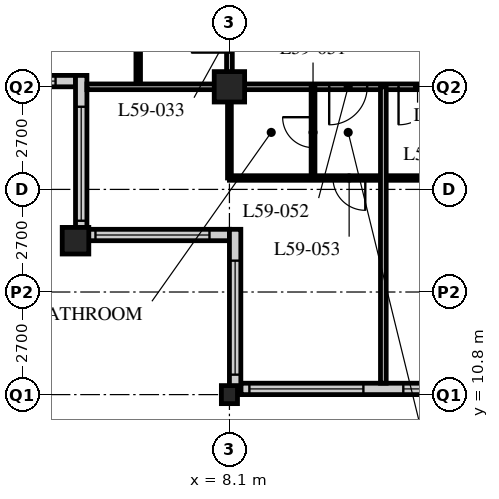
"""IFC4 building model, lengths in metres.
Left out: names, types, materials, properties, quantities, classifications, styles, units other than length and angle.
Written with IfcOpenShell. Run it as: python <this file> out.ifc"""

import sys

from ifc_helpers import new_model, si_unit, direction, frame, frame_2d, origin, origin_2d, place, context, subcontext, project, spatial, rectangle, hollow_rectangle, i_section, extrude, element, fill, save


model = new_model("IFC4")
c1 = context("Model", 3, precision=1e-05, world=origin(), true_north=direction((0.0, 1.0)))
c2 = subcontext(c1, "Body", "Model", "MODEL_VIEW")
j1 = project(units=[si_unit("LENGTHUNIT", "METRE"), si_unit("PLANEANGLEUNIT", "RADIAN")], contexts=[c1])
p1 = place(None, origin())
s1 = spatial("IfcSite", under=j1, at=p1, CompositionType="ELEMENT")
p2 = place(p1, origin())
s2 = spatial("IfcBuilding", under=s1, at=p2, CompositionType="ELEMENT")
p3 = place(p2, frame((0.0, 0.0, 228.0)))
s3 = spatial("IfcBuildingStorey", under=s2, at=p3, CompositionType="ELEMENT", Elevation=228.0)
p4 = place(p3, frame((4.05, 14.85, 0.0), z_axis=(0.0, 0.0, 1.0), x_axis=(1.0, 0.0, 0.0)))
e1 = element("IfcColumn", 1, at=p4, inside=s3, PredefinedType="COLUMN", context=c2, shape_type="SweptSolid", body=[
    extrude(hollow_rectangle(XDim=0.7, YDim=0.7, WallThickness=0.07, at=origin_2d()), origin(), (0.0, 0.0, 1.0), 3.6),
])
p5 = place(p3, frame((8.1, 10.8, 0.0), z_axis=(0.0, 0.0, 1.0), x_axis=(1.0, 0.0, 0.0)))
e2 = element("IfcColumn", 2, at=p5, inside=s3, PredefinedType="COLUMN", context=c2, shape_type="SweptSolid", body=[
    extrude(i_section(OverallWidth=0.424, OverallDepth=0.475, WebThickness=0.048, FlangeThickness=0.077, FilletRadius=0.015, at=origin_2d()), origin(), (0.0, 0.0, 1.0), 3.6),
])
p6 = place(p3, frame((8.1, 18.9, 0.0), z_axis=(0.0, 0.0, 1.0), x_axis=(1.0, 0.0, 0.0)))
e3 = element("IfcColumn", 3, at=p6, inside=s3, PredefinedType="COLUMN", context=c2, shape_type="SweptSolid", body=[
    extrude(hollow_rectangle(XDim=0.8, YDim=0.8, WallThickness=0.08, at=origin_2d()), origin(), (0.0, 0.0, 1.0), 3.6),
])
p7 = place(p3, frame((8.4, 10.95, 0.0), z_axis=(0.0, 0.0, 1.0), x_axis=(1.0, 0.0, 0.0)))
e4 = element("IfcWall", 4, at=p7, inside=s3, PredefinedType="SOLIDWALL", context=c2, shape_type="SweptSolid", body=[
    extrude(rectangle(XDim=40.2, YDim=0.3, at=frame_2d((20.1, 0.0))), origin(), (0.0, 0.0, 1.0), 3.39),
])
p8 = place(p7, frame((0.225, 0.0, 0.6)))
e5 = element("IfcOpeningElement", 5, at=p8, cuts=e4, PredefinedType="OPENING", context=c2, shape_type="SweptSolid", body=[
    extrude(rectangle(XDim=3.0, YDim=2.0, at=frame_2d((1.5, 1.0))), frame((0.0, 0.16, 0.0), z_axis=(0.0, -1.0, 0.0), x_axis=(1.0, 0.0, 0.0)), (0.0, 0.0, 1.0), 0.32),
])
p9 = place(p7, frame((4.275, 0.0, 0.6)))
e6 = element("IfcOpeningElement", 6, at=p9, cuts=e4, PredefinedType="OPENING", context=c2, shape_type="SweptSolid", body=[
    extrude(rectangle(XDim=3.0, YDim=2.0, at=frame_2d((1.5, 1.0))), frame((0.0, 0.16, 0.0), z_axis=(0.0, -1.0, 0.0), x_axis=(1.0, 0.0, 0.0)), (0.0, 0.0, 1.0), 0.32),
])
p10 = place(p7, frame((8.325, 0.0, 0.6)))
e7 = element("IfcOpeningElement", 7, at=p10, cuts=e4, PredefinedType="OPENING", context=c2, shape_type="SweptSolid", body=[
    extrude(rectangle(XDim=3.0, YDim=2.0, at=frame_2d((1.5, 1.0))), frame((0.0, 0.16, 0.0), z_axis=(0.0, -1.0, 0.0), x_axis=(1.0, 0.0, 0.0)), (0.0, 0.0, 1.0), 0.32),
])
p11 = place(p7, frame((12.375, 0.0, 0.6)))
e8 = element("IfcOpeningElement", 8, at=p11, cuts=e4, PredefinedType="OPENING", context=c2, shape_type="SweptSolid", body=[
    extrude(rectangle(XDim=3.0, YDim=2.0, at=frame_2d((1.5, 1.0))), frame((0.0, 0.16, 0.0), z_axis=(0.0, -1.0, 0.0), x_axis=(1.0, 0.0, 0.0)), (0.0, 0.0, 1.0), 0.32),
])
p12 = place(p7, frame((16.425, 0.0, 0.6)))
e9 = element("IfcOpeningElement", 9, at=p12, cuts=e4, PredefinedType="OPENING", context=c2, shape_type="SweptSolid", body=[
    extrude(rectangle(XDim=3.0, YDim=2.0, at=frame_2d((1.5, 1.0))), frame((0.0, 0.16, 0.0), z_axis=(0.0, -1.0, 0.0), x_axis=(1.0, 0.0, 0.0)), (0.0, 0.0, 1.0), 0.32),
])
p13 = place(p7, frame((20.475, 0.0, 0.6)))
e10 = element("IfcOpeningElement", 10, at=p13, cuts=e4, PredefinedType="OPENING", context=c2, shape_type="SweptSolid", body=[
    extrude(rectangle(XDim=3.0, YDim=2.0, at=frame_2d((1.5, 1.0))), frame((0.0, 0.16, 0.0), z_axis=(0.0, -1.0, 0.0), x_axis=(1.0, 0.0, 0.0)), (0.0, 0.0, 1.0), 0.32),
])
p14 = place(p7, frame((24.525, 0.0, 0.6)))
e11 = element("IfcOpeningElement", 11, at=p14, cuts=e4, PredefinedType="OPENING", context=c2, shape_type="SweptSolid", body=[
    extrude(rectangle(XDim=3.0, YDim=2.0, at=frame_2d((1.5, 1.0))), frame((0.0, 0.16, 0.0), z_axis=(0.0, -1.0, 0.0), x_axis=(1.0, 0.0, 0.0)), (0.0, 0.0, 1.0), 0.32),
])
p15 = place(p7, frame((28.575, 0.0, 0.6)))
e12 = element("IfcOpeningElement", 12, at=p15, cuts=e4, PredefinedType="OPENING", context=c2, shape_type="SweptSolid", body=[
    extrude(rectangle(XDim=3.0, YDim=2.0, at=frame_2d((1.5, 1.0))), frame((0.0, 0.16, 0.0), z_axis=(0.0, -1.0, 0.0), x_axis=(1.0, 0.0, 0.0)), (0.0, 0.0, 1.0), 0.32),
])
p16 = place(p7, frame((32.625, 0.0, 0.6)))
e13 = element("IfcOpeningElement", 13, at=p16, cuts=e4, PredefinedType="OPENING", context=c2, shape_type="SweptSolid", body=[
    extrude(rectangle(XDim=3.0, YDim=2.0, at=frame_2d((1.5, 1.0))), frame((0.0, 0.16, 0.0), z_axis=(0.0, -1.0, 0.0), x_axis=(1.0, 0.0, 0.0)), (0.0, 0.0, 1.0), 0.32),
])
p17 = place(p7, frame((36.675, 0.0, 0.6)))
e14 = element("IfcOpeningElement", 14, at=p17, cuts=e4, PredefinedType="OPENING", context=c2, shape_type="SweptSolid", body=[
    extrude(rectangle(XDim=3.0, YDim=2.0, at=frame_2d((1.5, 1.0))), frame((0.0, 0.16, 0.0), z_axis=(0.0, -1.0, 0.0), x_axis=(1.0, 0.0, 0.0)), (0.0, 0.0, 1.0), 0.32),
])
p18 = place(p3, frame((0.3, 19.05, 0.0), z_axis=(0.0, 0.0, 1.0), x_axis=(1.0, 0.0, 0.0)))
e15 = element("IfcWall", 15, at=p18, inside=s3, PredefinedType="SOLIDWALL", context=c2, shape_type="SweptSolid", body=[
    extrude(rectangle(XDim=3.75, YDim=0.3, at=frame_2d((1.875, 0.0))), origin(), (0.0, 0.0, 1.0), 3.39),
])
p19 = place(p18, frame((0.225, 0.0, 0.6)))
e16 = element("IfcOpeningElement", 16, at=p19, cuts=e15, PredefinedType="OPENING", context=c2, shape_type="SweptSolid", body=[
    extrude(rectangle(XDim=3.0, YDim=2.0, at=frame_2d((1.5, 1.0))), frame((0.0, 0.16, 0.0), z_axis=(0.0, -1.0, 0.0), x_axis=(1.0, 0.0, 0.0)), (0.0, 0.0, 1.0), 0.32),
])
p20 = place(p3, frame((4.2, 19.2, 0.0), z_axis=(0.0, 0.0, 1.0), x_axis=(0.0, -1.0, 0.0)))
e17 = element("IfcWall", 17, at=p20, inside=s3, PredefinedType="SOLIDWALL", context=c2, shape_type="SweptSolid", body=[
    extrude(rectangle(XDim=4.35, YDim=0.3, at=frame_2d((2.175, 0.0))), origin(), (0.0, 0.0, 1.0), 3.39),
])
p21 = place(p20, frame((0.825, 0.0, 0.6)))
e18 = element("IfcOpeningElement", 18, at=p21, cuts=e17, PredefinedType="OPENING", context=c2, shape_type="SweptSolid", body=[
    extrude(rectangle(XDim=3.0, YDim=2.0, at=frame_2d((1.5, 1.0))), frame((0.0, 0.16, 0.0), z_axis=(0.0, -1.0, 0.0), x_axis=(1.0, 0.0, 0.0)), (0.0, 0.0, 1.0), 0.32),
])
p22 = place(p3, frame((4.35, 15.0, 0.0), z_axis=(0.0, 0.0, 1.0), x_axis=(1.0, 0.0, 0.0)))
e19 = element("IfcWall", 19, at=p22, inside=s3, PredefinedType="SOLIDWALL", context=c2, shape_type="SweptSolid", body=[
    extrude(rectangle(XDim=3.75, YDim=0.3, at=frame_2d((1.875, 0.0))), origin(), (0.0, 0.0, 1.0), 3.39),
])
p23 = place(p22, frame((0.225, 0.0, 0.6)))
e20 = element("IfcOpeningElement", 20, at=p23, cuts=e19, PredefinedType="OPENING", context=c2, shape_type="SweptSolid", body=[
    extrude(rectangle(XDim=3.0, YDim=2.0, at=frame_2d((1.5, 1.0))), frame((0.0, 0.16, 0.0), z_axis=(0.0, -1.0, 0.0), x_axis=(1.0, 0.0, 0.0)), (0.0, 0.0, 1.0), 0.32),
])
p24 = place(p3, frame((8.25, 15.15, 0.0), z_axis=(0.0, 0.0, 1.0), x_axis=(0.0, -1.0, 0.0)))
e21 = element("IfcWall", 21, at=p24, inside=s3, PredefinedType="SOLIDWALL", context=c2, shape_type="SweptSolid", body=[
    extrude(rectangle(XDim=4.35, YDim=0.3, at=frame_2d((2.175, 0.0))), origin(), (0.0, 0.0, 1.0), 3.39),
])
p25 = place(p24, frame((0.825, 0.0, 0.6)))
e22 = element("IfcOpeningElement", 22, at=p25, cuts=e21, PredefinedType="OPENING", context=c2, shape_type="SweptSolid", body=[
    extrude(rectangle(XDim=3.0, YDim=2.0, at=frame_2d((1.5, 1.0))), frame((0.0, 0.16, 0.0), z_axis=(0.0, -1.0, 0.0), x_axis=(1.0, 0.0, 0.0)), (0.0, 0.0, 1.0), 0.32),
])
p26 = place(p3, frame((8.1, 18.9, 0.0), z_axis=(0.0, 0.0, 1.0), x_axis=(1.0, 0.0, 0.0)))
e23 = element("IfcWall", 23, at=p26, inside=s3, PredefinedType="PARTITIONING", context=c2, shape_type="SweptSolid", body=[
    extrude(rectangle(XDim=36.45, YDim=0.15, at=frame_2d((18.225, 0.0))), origin(), (0.0, 0.0, 1.0), 2.628),
])
p27 = place(p26, frame((4.45, 0.0, 0.0)))
e24 = element("IfcOpeningElement", 24, at=p27, cuts=e23, PredefinedType="OPENING", context=c2, shape_type="SweptSolid", body=[
    extrude(rectangle(XDim=1.0, YDim=2.1, at=frame_2d((0.5, 1.05))), frame((0.0, 0.085, 0.0), z_axis=(0.0, -1.0, 0.0), x_axis=(1.0, 0.0, 0.0)), (0.0, 0.0, 1.0), 0.17),
])
p28 = place(p26, frame((17.1, 0.0, 0.0)))
e25 = element("IfcOpeningElement", 25, at=p28, cuts=e23, PredefinedType="OPENING", context=c2, shape_type="SweptSolid", body=[
    extrude(rectangle(XDim=1.0, YDim=2.1, at=frame_2d((0.5, 1.05))), frame((0.0, 0.085, 0.0), z_axis=(0.0, -1.0, 0.0), x_axis=(1.0, 0.0, 0.0)), (0.0, 0.0, 1.0), 0.17),
])
p29 = place(p26, frame((29.05, 0.0, 0.0)))
e26 = element("IfcOpeningElement", 26, at=p29, cuts=e23, PredefinedType="OPENING", context=c2, shape_type="SweptSolid", body=[
    extrude(rectangle(XDim=1.0, YDim=2.1, at=frame_2d((0.5, 1.05))), frame((0.0, 0.085, 0.0), z_axis=(0.0, -1.0, 0.0), x_axis=(1.0, 0.0, 0.0)), (0.0, 0.0, 1.0), 0.17),
])
p30 = place(p26, frame((2.625, 0.0, 0.0)))
e27 = element("IfcOpeningElement", 27, at=p30, cuts=e23, PredefinedType="OPENING", context=c2, shape_type="SweptSolid", body=[
    extrude(rectangle(XDim=1.0, YDim=2.1, at=frame_2d((0.5, 1.05))), frame((0.0, 0.085, 0.0), z_axis=(0.0, -1.0, 0.0), x_axis=(1.0, 0.0, 0.0)), (0.0, 0.0, 1.0), 0.17),
])
p31 = place(p26, frame((33.925, 0.0, 0.0)))
e28 = element("IfcOpeningElement", 28, at=p31, cuts=e23, PredefinedType="OPENING", context=c2, shape_type="SweptSolid", body=[
    extrude(rectangle(XDim=1.0, YDim=2.1, at=frame_2d((0.5, 1.05))), frame((0.0, 0.085, 0.0), z_axis=(0.0, -1.0, 0.0), x_axis=(1.0, 0.0, 0.0)), (0.0, 0.0, 1.0), 0.17),
])
p32 = place(p3, frame((8.1, 18.9, 0.0), z_axis=(0.0, 0.0, 1.0), x_axis=(0.0, 1.0, 0.0)))
e29 = element("IfcWall", 29, at=p32, inside=s3, PredefinedType="PARTITIONING", context=c2, shape_type="SweptSolid", body=[
    extrude(rectangle(XDim=24.3, YDim=0.15, at=frame_2d((12.15, 0.0))), origin(), (0.0, 0.0, 1.0), 2.628),
])
p33 = place(p32, frame((0.9, 0.0, 0.0)))
e30 = element("IfcOpeningElement", 30, at=p33, cuts=e29, PredefinedType="OPENING", context=c2, shape_type="SweptSolid", body=[
    extrude(rectangle(XDim=1.0, YDim=2.1, at=frame_2d((0.5, 1.05))), frame((0.0, 0.085, 0.0), z_axis=(0.0, -1.0, 0.0), x_axis=(1.0, 0.0, 0.0)), (0.0, 0.0, 1.0), 0.17),
])
p34 = place(p32, frame((20.95, 0.0, 0.0)))
e31 = element("IfcOpeningElement", 31, at=p34, cuts=e29, PredefinedType="OPENING", context=c2, shape_type="SweptSolid", body=[
    extrude(rectangle(XDim=1.0, YDim=2.1, at=frame_2d((0.5, 1.05))), frame((0.0, 0.085, 0.0), z_axis=(0.0, -1.0, 0.0), x_axis=(1.0, 0.0, 0.0)), (0.0, 0.0, 1.0), 0.17),
])
p35 = place(p3, frame((5.7, 18.9, 0.0), z_axis=(0.0, 0.0, 1.0), x_axis=(0.0, 1.0, 0.0)))
e32 = element("IfcWall", 32, at=p35, inside=s3, PredefinedType="PARTITIONING", context=c2, shape_type="SweptSolid", body=[
    extrude(rectangle(XDim=20.25, YDim=0.12, at=frame_2d((10.125, 0.0))), origin(), (0.0, 0.0, 1.0), 3.39),
])
p36 = place(p35, frame((0.975, 0.0, 0.0)))
e33 = element("IfcOpeningElement", 33, at=p36, cuts=e32, PredefinedType="OPENING", context=c2, shape_type="SweptSolid", body=[
    extrude(rectangle(XDim=0.85, YDim=2.1, at=frame_2d((0.425, 1.05))), frame((0.0, 0.07, 0.0), z_axis=(0.0, -1.0, 0.0), x_axis=(1.0, 0.0, 0.0)), (0.0, 0.0, 1.0), 0.14),
])
p37 = place(p35, frame((8.425, 0.0, 0.0)))
e34 = element("IfcOpeningElement", 34, at=p37, cuts=e32, PredefinedType="OPENING", context=c2, shape_type="SweptSolid", body=[
    extrude(rectangle(XDim=0.85, YDim=2.1, at=frame_2d((0.425, 1.05))), frame((0.0, 0.07, 0.0), z_axis=(0.0, -1.0, 0.0), x_axis=(1.0, 0.0, 0.0)), (0.0, 0.0, 1.0), 0.14),
])
p38 = place(p35, frame((12.475, 0.0, 0.0)))
e35 = element("IfcOpeningElement", 35, at=p38, cuts=e32, PredefinedType="OPENING", context=c2, shape_type="SweptSolid", body=[
    extrude(rectangle(XDim=0.85, YDim=2.1, at=frame_2d((0.425, 1.05))), frame((0.0, 0.07, 0.0), z_axis=(0.0, -1.0, 0.0), x_axis=(1.0, 0.0, 0.0)), (0.0, 0.0, 1.0), 0.14),
])
p39 = place(p35, frame((16.525, 0.0, 0.0)))
e36 = element("IfcOpeningElement", 36, at=p39, cuts=e32, PredefinedType="OPENING", context=c2, shape_type="SweptSolid", body=[
    extrude(rectangle(XDim=0.85, YDim=2.1, at=frame_2d((0.425, 1.05))), frame((0.0, 0.07, 0.0), z_axis=(0.0, -1.0, 0.0), x_axis=(1.0, 0.0, 0.0)), (0.0, 0.0, 1.0), 0.14),
])
p40 = place(p3, frame((8.1, 16.5, 0.0), z_axis=(0.0, 0.0, 1.0), x_axis=(1.0, 0.0, 0.0)))
e37 = element("IfcWall", 37, at=p40, inside=s3, PredefinedType="PARTITIONING", context=c2, shape_type="SweptSolid", body=[
    extrude(rectangle(XDim=28.35, YDim=0.12, at=frame_2d((14.175, 0.0))), origin(), (0.0, 0.0, 1.0), 3.39),
])
p41 = place(p40, frame((5.025, 0.0, 0.0)))
e38 = element("IfcOpeningElement", 38, at=p41, cuts=e37, PredefinedType="OPENING", context=c2, shape_type="SweptSolid", body=[
    extrude(rectangle(XDim=0.85, YDim=2.1, at=frame_2d((0.425, 1.05))), frame((0.0, 0.07, 0.0), z_axis=(0.0, -1.0, 0.0), x_axis=(1.0, 0.0, 0.0)), (0.0, 0.0, 1.0), 0.14),
])
p42 = place(p40, frame((12.475, 0.0, 0.0)))
e39 = element("IfcOpeningElement", 39, at=p42, cuts=e37, PredefinedType="OPENING", context=c2, shape_type="SweptSolid", body=[
    extrude(rectangle(XDim=0.85, YDim=2.1, at=frame_2d((0.425, 1.05))), frame((0.0, 0.07, 0.0), z_axis=(0.0, -1.0, 0.0), x_axis=(1.0, 0.0, 0.0)), (0.0, 0.0, 1.0), 0.14),
])
p43 = place(p40, frame((17.175, 0.0, 0.0)))
e40 = element("IfcOpeningElement", 40, at=p43, cuts=e37, PredefinedType="OPENING", context=c2, shape_type="SweptSolid", body=[
    extrude(rectangle(XDim=0.85, YDim=2.1, at=frame_2d((0.425, 1.05))), frame((0.0, 0.07, 0.0), z_axis=(0.0, -1.0, 0.0), x_axis=(1.0, 0.0, 0.0)), (0.0, 0.0, 1.0), 0.14),
])
p44 = place(p40, frame((24.625, 0.0, 0.0)))
e41 = element("IfcOpeningElement", 41, at=p44, cuts=e37, PredefinedType="OPENING", context=c2, shape_type="SweptSolid", body=[
    extrude(rectangle(XDim=0.85, YDim=2.1, at=frame_2d((0.425, 1.05))), frame((0.0, 0.07, 0.0), z_axis=(0.0, -1.0, 0.0), x_axis=(1.0, 0.0, 0.0)), (0.0, 0.0, 1.0), 0.14),
])
p45 = place(p40, frame((2.725, 0.0, 0.0)))
e42 = element("IfcOpeningElement", 42, at=p45, cuts=e37, PredefinedType="OPENING", context=c2, shape_type="SweptSolid", body=[
    extrude(rectangle(XDim=0.85, YDim=2.1, at=frame_2d((0.425, 1.05))), frame((0.0, 0.07, 0.0), z_axis=(0.0, -1.0, 0.0), x_axis=(1.0, 0.0, 0.0)), (0.0, 0.0, 1.0), 0.14),
])
p46 = place(p3, frame((10.3, 18.9, 0.0), z_axis=(0.0, 0.0, 1.0), x_axis=(0.0, -1.0, 0.0)))
e43 = element("IfcWall", 43, at=p46, inside=s3, PredefinedType="PARTITIONING", context=c2, shape_type="SweptSolid", body=[
    extrude(rectangle(XDim=2.4, YDim=0.1, at=frame_2d((1.2, 0.0))), origin(), (0.0, 0.0, 1.0), 3.39),
])
p47 = place(p46, frame((0.8, 0.0, 0.0)))
e44 = element("IfcOpeningElement", 44, at=p47, cuts=e43, PredefinedType="OPENING", context=c2, shape_type="SweptSolid", body=[
    extrude(rectangle(XDim=0.8, YDim=2.1, at=frame_2d((0.4, 1.05))), frame((0.0, 0.06, 0.0), z_axis=(0.0, -1.0, 0.0), x_axis=(1.0, 0.0, 0.0)), (0.0, 0.0, 1.0), 0.12),
])
p48 = place(p3, frame((8.1, 18.9, 0.0), z_axis=(0.0, 0.0, 1.0), x_axis=(0.0, -1.0, 0.0)))
e45 = element("IfcWall", 45, at=p48, inside=s3, PredefinedType="PARTITIONING", context=c2, shape_type="SweptSolid", body=[
    extrude(rectangle(XDim=2.4, YDim=0.1, at=frame_2d((1.2, 0.0))), origin(), (0.0, 0.0, 1.0), 2.628),
])
p49 = place(p3, frame((4.35, 18.9, 0.0), z_axis=(0.0, 0.0, 1.0), x_axis=(1.0, 0.0, 0.0)))
e46 = element("IfcWall", 46, at=p49, inside=s3, PredefinedType="PARTITIONING", context=c2, shape_type="SweptSolid", body=[
    extrude(rectangle(XDim=3.75, YDim=0.15, at=frame_2d((1.875, 0.0))), origin(), (0.0, 0.0, 1.0), 2.628),
])
p50 = place(p3, frame((12.15, 18.9, 0.0), z_axis=(0.0, 0.0, 1.0), x_axis=(0.0, -1.0, 0.0)))
e47 = element("IfcWall", 47, at=p50, inside=s3, PredefinedType="PARTITIONING", context=c2, shape_type="SweptSolid", body=[
    extrude(rectangle(XDim=7.8, YDim=0.15, at=frame_2d((3.9, 0.0))), origin(), (0.0, 0.0, 1.0), 3.39),
])
p51 = place(p8, origin())
e48 = element("IfcWindow", 48, at=p51, inside=s3, PartitioningType="SINGLE_PANEL", PredefinedType="WINDOW", context=c2, shape_type="SweptSolid", body=[
    extrude(rectangle(XDim=3.0, YDim=2.0, at=frame_2d((1.5, 1.0))), frame((0.0, 0.03, 0.0), z_axis=(0.0, -1.0, 0.0), x_axis=(1.0, 0.0, 0.0)), (0.0, 0.0, 1.0), 0.06),
])
fill(e5, e48)
p52 = place(p9, origin())
e49 = element("IfcWindow", 49, at=p52, inside=s3, PartitioningType="SINGLE_PANEL", PredefinedType="WINDOW", context=c2, shape_type="SweptSolid", body=[
    extrude(rectangle(XDim=3.0, YDim=2.0, at=frame_2d((1.5, 1.0))), frame((0.0, 0.03, 0.0), z_axis=(0.0, -1.0, 0.0), x_axis=(1.0, 0.0, 0.0)), (0.0, 0.0, 1.0), 0.06),
])
fill(e6, e49)
p53 = place(p19, origin())
e50 = element("IfcWindow", 50, at=p53, inside=s3, PartitioningType="SINGLE_PANEL", PredefinedType="WINDOW", context=c2, shape_type="SweptSolid", body=[
    extrude(rectangle(XDim=3.0, YDim=2.0, at=frame_2d((1.5, 1.0))), frame((0.0, 0.03, 0.0), z_axis=(0.0, -1.0, 0.0), x_axis=(1.0, 0.0, 0.0)), (0.0, 0.0, 1.0), 0.06),
])
fill(e16, e50)
p54 = place(p21, origin())
e51 = element("IfcWindow", 51, at=p54, inside=s3, PartitioningType="SINGLE_PANEL", PredefinedType="WINDOW", context=c2, shape_type="SweptSolid", body=[
    extrude(rectangle(XDim=3.0, YDim=2.0, at=frame_2d((1.5, 1.0))), frame((0.0, 0.03, 0.0), z_axis=(0.0, -1.0, 0.0), x_axis=(1.0, 0.0, 0.0)), (0.0, 0.0, 1.0), 0.06),
])
fill(e18, e51)
p55 = place(p23, origin())
e52 = element("IfcWindow", 52, at=p55, inside=s3, PartitioningType="SINGLE_PANEL", PredefinedType="WINDOW", context=c2, shape_type="SweptSolid", body=[
    extrude(rectangle(XDim=3.0, YDim=2.0, at=frame_2d((1.5, 1.0))), frame((0.0, 0.03, 0.0), z_axis=(0.0, -1.0, 0.0), x_axis=(1.0, 0.0, 0.0)), (0.0, 0.0, 1.0), 0.06),
])
fill(e20, e52)
p56 = place(p25, origin())
e53 = element("IfcWindow", 53, at=p56, inside=s3, PartitioningType="SINGLE_PANEL", PredefinedType="WINDOW", context=c2, shape_type="SweptSolid", body=[
    extrude(rectangle(XDim=3.0, YDim=2.0, at=frame_2d((1.5, 1.0))), frame((0.0, 0.03, 0.0), z_axis=(0.0, -1.0, 0.0), x_axis=(1.0, 0.0, 0.0)), (0.0, 0.0, 1.0), 0.06),
])
fill(e22, e53)
p57 = place(p27, origin())
e54 = element("IfcDoor", 54, at=p57, inside=s3, OperationType="SINGLE_SWING_RIGHT", PredefinedType="DOOR", context=c2, shape_type="SweptSolid", body=[
    extrude(rectangle(XDim=1.0, YDim=2.1, at=frame_2d((0.5, 1.05))), frame((0.0, 0.025, 0.0), z_axis=(0.0, -1.0, 0.0), x_axis=(1.0, 0.0, 0.0)), (0.0, 0.0, 1.0), 0.05),
])
fill(e24, e54)
p58 = place(p33, origin())
e55 = element("IfcDoor", 55, at=p58, inside=s3, OperationType="SINGLE_SWING_LEFT", PredefinedType="DOOR", context=c2, shape_type="SweptSolid", body=[
    extrude(rectangle(XDim=1.0, YDim=2.1, at=frame_2d((0.5, 1.05))), frame((0.0, 0.025, 0.0), z_axis=(0.0, -1.0, 0.0), x_axis=(1.0, 0.0, 0.0)), (0.0, 0.0, 1.0), 0.05),
])
fill(e30, e55)
p59 = place(p47, origin())
e56 = element("IfcDoor", 56, at=p59, inside=s3, OperationType="SINGLE_SWING_RIGHT", PredefinedType="DOOR", context=c2, shape_type="SweptSolid", body=[
    extrude(rectangle(XDim=0.8, YDim=2.1, at=frame_2d((0.4, 1.05))), frame((0.0, 0.025, 0.0), z_axis=(0.0, -1.0, 0.0), x_axis=(1.0, 0.0, 0.0)), (0.0, 0.0, 1.0), 0.05),
])
fill(e44, e56)
p60 = place(p30, origin())
e57 = element("IfcDoor", 57, at=p60, inside=s3, OperationType="SINGLE_SWING_RIGHT", PredefinedType="DOOR", context=c2, shape_type="SweptSolid", body=[
    extrude(rectangle(XDim=1.0, YDim=2.1, at=frame_2d((0.5, 1.05))), frame((0.0, 0.025, 0.0), z_axis=(0.0, -1.0, 0.0), x_axis=(1.0, 0.0, 0.0)), (0.0, 0.0, 1.0), 0.05),
])
fill(e27, e57)
p61 = place(p45, origin())
e58 = element("IfcDoor", 58, at=p61, inside=s3, OperationType="SINGLE_SWING_LEFT", PredefinedType="DOOR", context=c2, shape_type="SweptSolid", body=[
    extrude(rectangle(XDim=0.85, YDim=2.1, at=frame_2d((0.425, 1.05))), frame((0.0, 0.025, 0.0), z_axis=(0.0, -1.0, 0.0), x_axis=(1.0, 0.0, 0.0)), (0.0, 0.0, 1.0), 0.05),
])
fill(e42, e58)
save(model, sys.argv[1])
